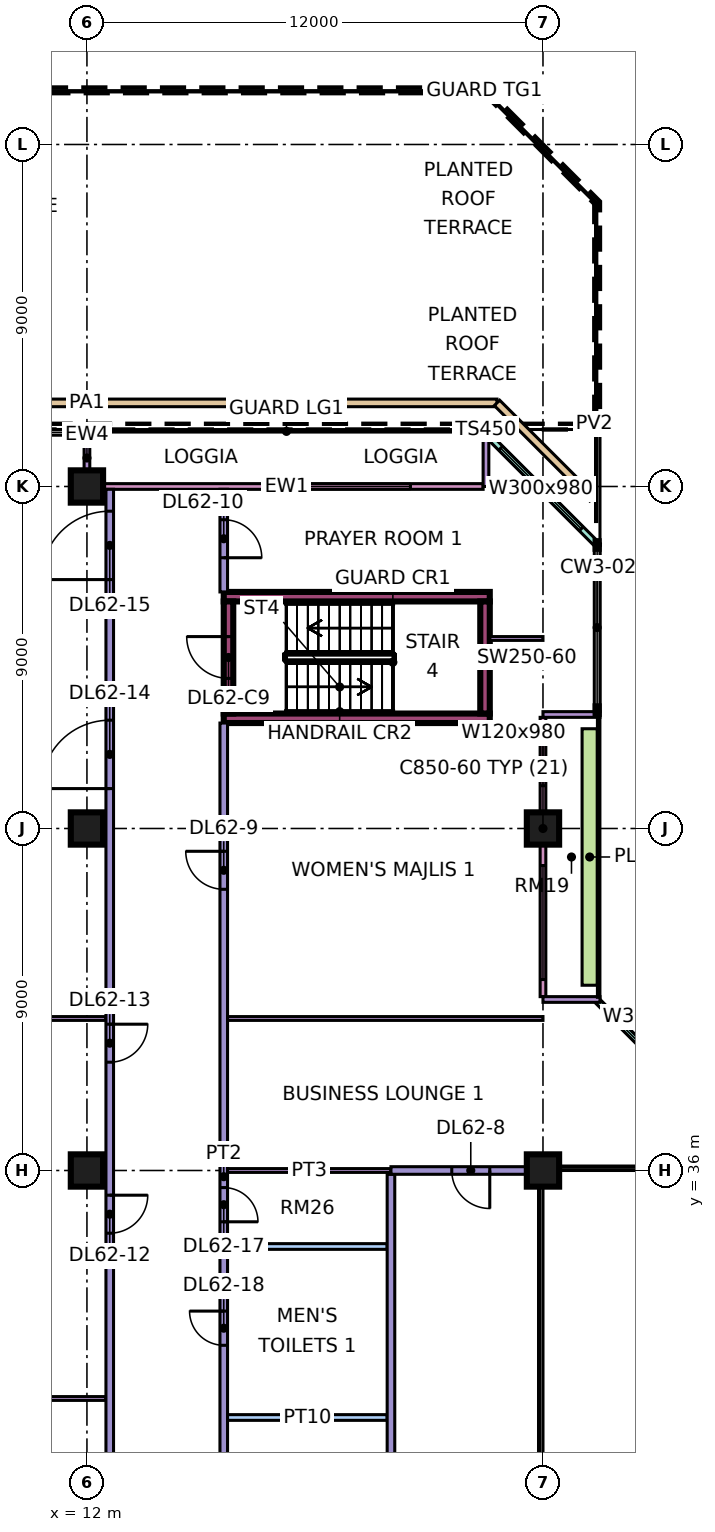
"""IFC4 building model, lengths in metres.
Left out: names, types, materials, properties, quantities, classifications, styles, units other than length and angle.
Written with IfcOpenShell. Run it as: python <this file> out.ifc"""

import sys

from ifc_helpers import new_model, si_unit, direction, frame, frame_2d, origin, origin_2d, place, context, subcontext, project, spatial, rectangle, extrude, element, fill, save


model = new_model("IFC4")
c1 = context("Model", 3, precision=1e-05, world=origin(), true_north=direction((0.0, 1.0)))
c2 = subcontext(c1, "Body", "Model", "MODEL_VIEW")
j1 = project(units=[si_unit("LENGTHUNIT", "METRE"), si_unit("PLANEANGLEUNIT", "RADIAN")], contexts=[c1])
p1 = place(None, origin())
s1 = spatial("IfcSite", under=j1, at=p1, CompositionType="ELEMENT")
p2 = place(p1, origin())
s2 = spatial("IfcBuilding", under=s1, at=p2, CompositionType="ELEMENT")
p3 = place(p2, frame((0.0, 0.0, 262.15)))
s3 = spatial("IfcBuildingStorey", under=s2, at=p3, CompositionType="ELEMENT", Elevation=262.15)
for number, where, z_axis, x_axis in (
    (1, (12.0, 36.0, 0.0), (0.0, 0.0, 1.0), (1.0, 0.0, 0.0)),
    (2, (12.0, 45.0, 0.0), (0.0, 0.0, 1.0), (1.0, 0.0, 0.0)),
    (3, (12.0, 54.0, 0.0), (0.0, 0.0, 1.0), (1.0, 0.0, 0.0)),
    (4, (24.0, 36.0, 0.0), (0.0, 0.0, 1.0), (1.0, 0.0, 0.0)),
    (5, (24.0, 45.0, 0.0), (0.0, 0.0, 1.0), (1.0, 0.0, 0.0)),
):
    element("IfcColumn", number, at=place(p3, frame(where, z_axis=z_axis, x_axis=x_axis)), inside=s3, PredefinedType="COLUMN", context=c2, shape_type="SweptSolid", body=[
        extrude(rectangle(XDim=0.85, YDim=0.85, at=origin_2d()), origin(), (0.0, 0.0, 1.0), 11.25),
    ])
for number, where, z_axis, x_axis in (
    (6, (15.6, 47.9, 0.0), (0.0, 0.0, 1.0), (1.0, 0.0, 0.0)),
    (7, (15.6, 51.1, 0.0), (0.0, 0.0, 1.0), (1.0, 0.0, 0.0)),
):
    element("IfcWall", number, at=place(p3, frame(where, z_axis=z_axis, x_axis=x_axis)), inside=s3, PredefinedType="SHEAR", context=c2, shape_type="SweptSolid", body=[
        extrude(rectangle(XDim=7.0, YDim=0.25, at=frame_2d((3.5, 0.0))), origin(), (0.0, 0.0, 1.0), 11.25),
    ])
p4 = place(p3, frame((15.725, 48.025, 0.0), z_axis=(0.0, 0.0, 1.0), x_axis=(0.0, 1.0, 0.0)))
e8 = element("IfcWall", 8, at=p4, inside=s3, PredefinedType="SHEAR", context=c2, shape_type="SweptSolid", body=[
    extrude(rectangle(XDim=2.95, YDim=0.25, at=frame_2d((1.475, 0.0))), origin(), (0.0, 0.0, 1.0), 11.25),
])
p5 = place(p4, frame((0.925, 0.0, 0.0)))
e9 = element("IfcOpeningElement", 9, at=p5, cuts=e8, PredefinedType="OPENING", context=c2, shape_type="SweptSolid", body=[
    extrude(rectangle(XDim=1.1, YDim=2.2, at=frame_2d((0.55, 1.1))), frame((0.0, 0.135, 0.0), z_axis=(0.0, -1.0, 0.0), x_axis=(1.0, 0.0, 0.0)), (0.0, 0.0, 1.0), 0.27),
])
p6 = place(p3, frame((22.475, 48.025, 0.0), z_axis=(0.0, 0.0, 1.0), x_axis=(0.0, 1.0, 0.0)))
e10 = element("IfcWall", 10, at=p6, inside=s3, PredefinedType="SHEAR", context=c2, shape_type="SweptSolid", body=[
    extrude(rectangle(XDim=2.95, YDim=0.25, at=frame_2d((1.475, 0.0))), origin(), (0.0, 0.0, 1.0), 11.25),
])
p7 = place(p3, frame((28.447, 37.447, 0.0), z_axis=(0.0, 0.0, 1.0), x_axis=(-0.707106781187, 0.707106781187, 0.0)))
e11 = element("IfcWall", 11, at=p7, inside=s3, PredefinedType="SOLIDWALL", context=c2, shape_type="SweptSolid", body=[
    extrude(rectangle(XDim=4.243, YDim=0.15, at=frame_2d((2.121, 0.0))), origin(), (0.0, 0.0, 1.0), 10.85),
])
p8 = place(p7, frame((0.621, 0.0, 0.45)))
e12 = element("IfcOpeningElement", 12, at=p8, cuts=e11, PredefinedType="OPENING", context=c2, shape_type="SweptSolid", body=[
    extrude(rectangle(XDim=3.0, YDim=9.8, at=frame_2d((1.5, 4.9))), frame((0.0, 0.085, 0.0), z_axis=(0.0, -1.0, 0.0), x_axis=(1.0, 0.0, 0.0)), (0.0, 0.0, 1.0), 0.17),
])
p9 = place(p3, frame((24.0, 40.575, 0.0), z_axis=(0.0, 0.0, 1.0), x_axis=(0.0, 1.0, 0.0)))
e13 = element("IfcWall", 13, at=p9, inside=s3, PredefinedType="SOLIDWALL", context=c2, shape_type="SweptSolid", body=[
    extrude(rectangle(XDim=7.35, YDim=0.15, at=frame_2d((3.675, 0.0))), origin(), (0.0, 0.0, 1.0), 10.85),
])
p10 = place(p9, frame((0.45, 0.0, 0.45)))
e14 = element("IfcOpeningElement", 14, at=p10, cuts=e13, PredefinedType="OPENING", context=c2, shape_type="SweptSolid", body=[
    extrude(rectangle(XDim=3.0, YDim=9.8, at=frame_2d((1.5, 4.9))), frame((0.0, 0.085, 0.0), z_axis=(0.0, -1.0, 0.0), x_axis=(1.0, 0.0, 0.0)), (0.0, 0.0, 1.0), 0.17),
])
p11 = place(p9, frame((5.55, 0.0, 0.45)))
e15 = element("IfcOpeningElement", 15, at=p11, cuts=e13, PredefinedType="OPENING", context=c2, shape_type="SweptSolid", body=[
    extrude(rectangle(XDim=1.2, YDim=9.8, at=frame_2d((0.6, 4.9))), frame((0.0, 0.085, 0.0), z_axis=(0.0, -1.0, 0.0), x_axis=(1.0, 0.0, 0.0)), (0.0, 0.0, 1.0), 0.17),
])
for number, where, z_axis, x_axis in (
    (16, (25.5, 40.5, 0.0), (0.0, 0.0, 1.0), (-1.0, 0.0, 0.0)),
    (17, (25.5, 48.0, 0.0), (0.0, 0.0, 1.0), (-1.0, 0.0, 0.0)),
):
    element("IfcWall", number, at=place(p3, frame(where, z_axis=z_axis, x_axis=x_axis)), inside=s3, PredefinedType="SOLIDWALL", context=c2, shape_type="SweptSolid", body=[
        extrude(rectangle(XDim=1.5, YDim=0.15, at=frame_2d((0.75, 0.0))), origin(), (0.0, 0.0, 1.0), 10.85),
    ])
p12 = place(p3, frame((25.447, 52.447, 0.0), z_axis=(0.0, 0.0, 1.0), x_axis=(-0.707106781187, 0.707106781187, 0.0)))
e18 = element("IfcWall", 18, at=p12, inside=s3, PredefinedType="SOLIDWALL", context=c2, shape_type="SweptSolid", body=[
    extrude(rectangle(XDim=4.243, YDim=0.15, at=frame_2d((2.121, 0.0))), origin(), (0.0, 0.0, 1.0), 10.85),
])
p13 = place(p12, frame((0.621, 0.0, 0.45)))
e19 = element("IfcOpeningElement", 19, at=p13, cuts=e18, PredefinedType="OPENING", context=c2, shape_type="SweptSolid", body=[
    extrude(rectangle(XDim=3.0, YDim=9.8, at=frame_2d((1.5, 4.9))), frame((0.0, 0.085, 0.0), z_axis=(0.0, -1.0, 0.0), x_axis=(1.0, 0.0, 0.0)), (0.0, 0.0, 1.0), 0.17),
])
p14 = place(p3, frame((22.425, 54.0, 0.0), z_axis=(0.0, 0.0, 1.0), x_axis=(-1.0, 0.0, 0.0)))
e20 = element("IfcWall", 20, at=p14, inside=s3, PredefinedType="SOLIDWALL", context=c2, shape_type="SweptSolid", body=[
    extrude(rectangle(XDim=10.35, YDim=0.15, at=frame_2d((5.175, 0.0))), origin(), (0.0, 0.0, 1.0), 10.85),
])
p15 = place(p14, frame((1.913, 0.0, 0.45)))
e21 = element("IfcOpeningElement", 21, at=p15, cuts=e20, PredefinedType="OPENING", context=c2, shape_type="SweptSolid", body=[
    extrude(rectangle(XDim=3.0, YDim=9.8, at=frame_2d((1.5, 4.9))), frame((0.0, 0.085, 0.0), z_axis=(0.0, -1.0, 0.0), x_axis=(1.0, 0.0, 0.0)), (0.0, 0.0, 1.0), 0.17),
])
for number, where, z_axis, x_axis in (
    (22, (22.5, 55.5, 0.0), (0.0, 0.0, 1.0), (0.0, -1.0, 0.0)),
    (23, (12.0, 55.5, 0.0), (0.0, 0.0, 1.0), (0.0, -1.0, 0.0)),
):
    element("IfcWall", number, at=place(p3, frame(where, z_axis=z_axis, x_axis=x_axis)), inside=s3, PredefinedType="SOLIDWALL", context=c2, shape_type="SweptSolid", body=[
        extrude(rectangle(XDim=1.5, YDim=0.15, at=frame_2d((0.75, 0.0))), origin(), (0.0, 0.0, 1.0), 10.85),
    ])
p16 = place(p3, frame((25.229, 40.875, 0.0), z_axis=(0.0, 0.0, 1.0), x_axis=(0.0, 1.0, 0.0)))
e24 = element("IfcWall", 24, at=p16, inside=s3, PredefinedType="SOLIDWALL", context=c2, shape_type="SweptSolid", body=[
    extrude(rectangle(XDim=6.75, YDim=0.4, at=frame_2d((3.375, 0.0))), origin(), (0.0, 0.0, 1.0), 0.7),
])
p17 = place(p3, frame((1.21, 56.2, 0.0), z_axis=(0.0, 0.0, 1.0), x_axis=(1.0, 0.0, 0.0)))
e25 = element("IfcWall", 25, at=p17, inside=s3, PredefinedType="PARAPET", context=c2, shape_type="SweptSolid", body=[
    extrude(rectangle(XDim=21.58, YDim=0.2, at=frame_2d((10.79, 0.0))), origin(), (0.0, 0.0, 1.0), 0.5),
])
p18 = place(p3, frame((22.79, 56.2, 0.0), z_axis=(0.0, 0.0, 1.0), x_axis=(0.707106781187, -0.707106781187, 0.0)))
e26 = element("IfcWall", 26, at=p18, inside=s3, PredefinedType="PARAPET", context=c2, shape_type="SweptSolid", body=[
    extrude(rectangle(XDim=3.55, YDim=0.2, at=frame_2d((1.775, 0.0))), origin(), (0.0, 0.0, 1.0), 0.5),
])
p19 = place(p3, frame((0.0, 30.0, 0.0), z_axis=(0.0, 0.0, 1.0), x_axis=(1.0, 0.0, 0.0)))
e27 = element("IfcWall", 27, at=p19, inside=s3, PredefinedType="PARTITIONING", context=c2, shape_type="SweptSolid", body=[
    extrude(rectangle(XDim=12.5, YDim=0.1, at=frame_2d((6.25, 0.0))), origin(), (0.0, 0.0, 1.0), 10.85),
])
p20 = place(p3, frame((0.074, 40.0, 0.0), z_axis=(0.0, 0.0, 1.0), x_axis=(1.0, 0.0, 0.0)))
e28 = element("IfcWall", 28, at=p20, inside=s3, PredefinedType="PARTITIONING", context=c2, shape_type="SweptSolid", body=[
    extrude(rectangle(XDim=12.426, YDim=0.1, at=frame_2d((6.213, 0.0))), origin(), (0.0, 0.0, 1.0), 10.85),
])
p21 = place(p3, frame((12.6, 22.9, 0.0), z_axis=(0.0, 0.0, 1.0), x_axis=(0.0, 1.0, 0.0)))
e29 = element("IfcWall", 29, at=p21, inside=s3, PredefinedType="PARTITIONING", context=c2, shape_type="SweptSolid", body=[
    extrude(rectangle(XDim=31.026, YDim=0.2, at=frame_2d((15.513, 0.0))), origin(), (0.0, 0.0, 1.0), 10.85),
])
p22 = place(p21, frame((11.45, 0.0, 0.0)))
e30 = element("IfcOpeningElement", 30, at=p22, cuts=e29, PredefinedType="OPENING", context=c2, shape_type="SweptSolid", body=[
    extrude(rectangle(XDim=1.0, YDim=2.1, at=frame_2d((0.5, 1.05))), frame((0.0, 0.11, 0.0), z_axis=(0.0, -1.0, 0.0), x_axis=(1.0, 0.0, 0.0)), (0.0, 0.0, 1.0), 0.22),
])
p23 = place(p21, frame((15.95, 0.0, 0.0)))
e31 = element("IfcOpeningElement", 31, at=p23, cuts=e29, PredefinedType="OPENING", context=c2, shape_type="SweptSolid", body=[
    extrude(rectangle(XDim=1.0, YDim=2.1, at=frame_2d((0.5, 1.05))), frame((0.0, 0.11, 0.0), z_axis=(0.0, -1.0, 0.0), x_axis=(1.0, 0.0, 0.0)), (0.0, 0.0, 1.0), 0.22),
])
p24 = place(p21, frame((23.15, 0.0, 0.0)))
e32 = element("IfcOpeningElement", 32, at=p24, cuts=e29, PredefinedType="OPENING", context=c2, shape_type="SweptSolid", body=[
    extrude(rectangle(XDim=1.8, YDim=2.1, at=frame_2d((0.9, 1.05))), frame((0.0, 0.11, 0.0), z_axis=(0.0, -1.0, 0.0), x_axis=(1.0, 0.0, 0.0)), (0.0, 0.0, 1.0), 0.22),
])
p25 = place(p21, frame((28.65, 0.0, 0.0)))
e33 = element("IfcOpeningElement", 33, at=p25, cuts=e29, PredefinedType="OPENING", context=c2, shape_type="SweptSolid", body=[
    extrude(rectangle(XDim=1.8, YDim=2.1, at=frame_2d((0.9, 1.05))), frame((0.0, 0.11, 0.0), z_axis=(0.0, -1.0, 0.0), x_axis=(1.0, 0.0, 0.0)), (0.0, 0.0, 1.0), 0.22),
])
p26 = place(p3, frame((15.6, 23.9, 0.0), z_axis=(0.0, 0.0, 1.0), x_axis=(0.0, 1.0, 0.0)))
e34 = element("IfcWall", 34, at=p26, inside=s3, PredefinedType="PARTITIONING", context=c2, shape_type="SweptSolid", body=[
    extrude(rectangle(XDim=23.875, YDim=0.2, at=frame_2d((11.938, 0.0))), origin(), (0.0, 0.0, 1.0), 10.85),
])
p27 = place(p26, frame((19.5, 0.0, 0.0)))
e35 = element("IfcOpeningElement", 35, at=p27, cuts=e34, PredefinedType="OPENING", context=c2, shape_type="SweptSolid", body=[
    extrude(rectangle(XDim=1.0, YDim=2.1, at=frame_2d((0.5, 1.05))), frame((0.0, 0.11, 0.0), z_axis=(0.0, -1.0, 0.0), x_axis=(1.0, 0.0, 0.0)), (0.0, 0.0, 1.0), 0.22),
])
p28 = place(p26, frame((10.75, 0.0, 0.0)))
e36 = element("IfcOpeningElement", 36, at=p28, cuts=e34, PredefinedType="OPENING", context=c2, shape_type="SweptSolid", body=[
    extrude(rectangle(XDim=0.9, YDim=2.1, at=frame_2d((0.45, 1.05))), frame((0.0, 0.11, 0.0), z_axis=(0.0, -1.0, 0.0), x_axis=(1.0, 0.0, 0.0)), (0.0, 0.0, 1.0), 0.22),
])
p29 = place(p26, frame((7.5, 0.0, 0.0)))
e37 = element("IfcOpeningElement", 37, at=p29, cuts=e34, PredefinedType="OPENING", context=c2, shape_type="SweptSolid", body=[
    extrude(rectangle(XDim=0.9, YDim=2.1, at=frame_2d((0.45, 1.05))), frame((0.0, 0.11, 0.0), z_axis=(0.0, -1.0, 0.0), x_axis=(1.0, 0.0, 0.0)), (0.0, 0.0, 1.0), 0.22),
])
p30 = place(p26, frame((2.5, 0.0, 0.0)))
e38 = element("IfcOpeningElement", 38, at=p30, cuts=e34, PredefinedType="OPENING", context=c2, shape_type="SweptSolid", body=[
    extrude(rectangle(XDim=0.9, YDim=2.1, at=frame_2d((0.45, 1.05))), frame((0.0, 0.11, 0.0), z_axis=(0.0, -1.0, 0.0), x_axis=(1.0, 0.0, 0.0)), (0.0, 0.0, 1.0), 0.22),
])
p31 = place(p3, frame((15.6, 51.225, 0.0), z_axis=(0.0, 0.0, 1.0), x_axis=(0.0, 1.0, 0.0)))
e39 = element("IfcWall", 39, at=p31, inside=s3, PredefinedType="PARTITIONING", context=c2, shape_type="SweptSolid", body=[
    extrude(rectangle(XDim=2.701, YDim=0.2, at=frame_2d((1.351, 0.0))), origin(), (0.0, 0.0, 1.0), 10.85),
])
p32 = place(p31, frame((0.9, 0.0, 0.0)))
e40 = element("IfcOpeningElement", 40, at=p32, cuts=e39, PredefinedType="OPENING", context=c2, shape_type="SweptSolid", body=[
    extrude(rectangle(XDim=1.0, YDim=2.1, at=frame_2d((0.5, 1.05))), frame((0.0, 0.11, 0.0), z_axis=(0.0, -1.0, 0.0), x_axis=(1.0, 0.0, 0.0)), (0.0, 0.0, 1.0), 0.22),
])
for number, where, z_axis, x_axis in (
    (41, (15.7, 29.5, 0.0), (0.0, 0.0, 1.0), (1.0, 0.0, 0.0)),
    (42, (15.7, 34.0, 0.0), (0.0, 0.0, 1.0), (1.0, 0.0, 0.0)),
):
    element("IfcWall", number, at=place(p3, frame(where, z_axis=z_axis, x_axis=x_axis)), inside=s3, PredefinedType="PARTITIONING", context=c2, shape_type="SweptSolid", body=[
        extrude(rectangle(XDim=4.2, YDim=0.15, at=frame_2d((2.1, 0.0))), origin(), (0.0, 0.0, 1.0), 10.85),
    ])
p33 = place(p3, frame((15.7, 36.0, 0.0), z_axis=(0.0, 0.0, 1.0), x_axis=(1.0, 0.0, 0.0)))
e43 = element("IfcWall", 43, at=p33, inside=s3, PredefinedType="PARTITIONING", context=c2, shape_type="SweptSolid", body=[
    extrude(rectangle(XDim=4.3, YDim=0.1, at=frame_2d((2.15, 0.0))), origin(), (0.0, 0.0, 1.0), 10.85),
])
p34 = place(p3, frame((15.7, 40.0, 0.0), z_axis=(0.0, 0.0, 1.0), x_axis=(1.0, 0.0, 0.0)))
e44 = element("IfcWall", 44, at=p34, inside=s3, PredefinedType="PARTITIONING", context=c2, shape_type="SweptSolid", body=[
    extrude(rectangle(XDim=8.3, YDim=0.1, at=frame_2d((4.15, 0.0))), origin(), (0.0, 0.0, 1.0), 10.85),
])
p35 = place(p3, frame((20.0, 23.9, 0.0), z_axis=(0.0, 0.0, 1.0), x_axis=(0.0, 1.0, 0.0)))
e45 = element("IfcWall", 45, at=p35, inside=s3, PredefinedType="PARTITIONING", context=c2, shape_type="SweptSolid", body=[
    extrude(rectangle(XDim=12.0, YDim=0.2, at=frame_2d((6.0, 0.0))), origin(), (0.0, 0.0, 1.0), 10.85),
])
p36 = place(p3, frame((20.0, 36.0, 0.0), z_axis=(0.0, 0.0, 1.0), x_axis=(1.0, 0.0, 0.0)))
e46 = element("IfcWall", 46, at=p36, inside=s3, PredefinedType="PARTITIONING", context=c2, shape_type="SweptSolid", body=[
    extrude(rectangle(XDim=4.0, YDim=0.2, at=frame_2d((2.0, 0.0))), origin(), (0.0, 0.0, 1.0), 10.85),
])
p37 = place(p36, frame((1.6, 0.0, 0.0)))
e47 = element("IfcOpeningElement", 47, at=p37, cuts=e46, PredefinedType="OPENING", context=c2, shape_type="SweptSolid", body=[
    extrude(rectangle(XDim=1.0, YDim=2.1, at=frame_2d((0.5, 1.05))), frame((0.0, 0.11, 0.0), z_axis=(0.0, -1.0, 0.0), x_axis=(1.0, 0.0, 0.0)), (0.0, 0.0, 1.0), 0.22),
])
p38 = place(p3, frame((22.6, 50.0, 0.0), z_axis=(0.0, 0.0, 1.0), x_axis=(1.0, 0.0, 0.0)))
e48 = element("IfcWall", 48, at=p38, inside=s3, PredefinedType="PARTITIONING", context=c2, shape_type="SweptSolid", body=[
    extrude(rectangle(XDim=1.4, YDim=0.1, at=frame_2d((0.7, 0.0))), origin(), (0.0, 0.0, 1.0), 10.85),
])
p39 = place(p8, origin())
e49 = element("IfcWindow", 49, at=p39, inside=s3, PartitioningType="SINGLE_PANEL", PredefinedType="WINDOW", context=c2, shape_type="SweptSolid", body=[
    extrude(rectangle(XDim=3.0, YDim=9.8, at=frame_2d((1.5, 4.9))), frame((0.0, 0.03, 0.0), z_axis=(0.0, -1.0, 0.0), x_axis=(1.0, 0.0, 0.0)), (0.0, 0.0, 1.0), 0.06),
])
fill(e12, e49)
p40 = place(p10, origin())
e50 = element("IfcWindow", 50, at=p40, inside=s3, PartitioningType="SINGLE_PANEL", PredefinedType="WINDOW", context=c2, shape_type="SweptSolid", body=[
    extrude(rectangle(XDim=3.0, YDim=9.8, at=frame_2d((1.5, 4.9))), frame((0.0, 0.03, 0.0), z_axis=(0.0, -1.0, 0.0), x_axis=(1.0, 0.0, 0.0)), (0.0, 0.0, 1.0), 0.06),
])
fill(e14, e50)
p41 = place(p11, origin())
e51 = element("IfcWindow", 51, at=p41, inside=s3, PartitioningType="SINGLE_PANEL", PredefinedType="WINDOW", context=c2, shape_type="SweptSolid", body=[
    extrude(rectangle(XDim=1.2, YDim=9.8, at=frame_2d((0.6, 4.9))), frame((0.0, 0.03, 0.0), z_axis=(0.0, -1.0, 0.0), x_axis=(1.0, 0.0, 0.0)), (0.0, 0.0, 1.0), 0.06),
])
fill(e15, e51)
p42 = place(p13, origin())
e52 = element("IfcWindow", 52, at=p42, inside=s3, PartitioningType="SINGLE_PANEL", PredefinedType="WINDOW", context=c2, shape_type="SweptSolid", body=[
    extrude(rectangle(XDim=3.0, YDim=9.8, at=frame_2d((1.5, 4.9))), frame((0.0, 0.03, 0.0), z_axis=(0.0, -1.0, 0.0), x_axis=(1.0, 0.0, 0.0)), (0.0, 0.0, 1.0), 0.06),
])
fill(e19, e52)
p43 = place(p15, origin())
e53 = element("IfcWindow", 53, at=p43, inside=s3, PartitioningType="SINGLE_PANEL", PredefinedType="WINDOW", context=c2, shape_type="SweptSolid", body=[
    extrude(rectangle(XDim=3.0, YDim=9.8, at=frame_2d((1.5, 4.9))), frame((0.0, 0.03, 0.0), z_axis=(0.0, -1.0, 0.0), x_axis=(1.0, 0.0, 0.0)), (0.0, 0.0, 1.0), 0.06),
])
fill(e21, e53)
p44 = place(p5, frame((1.1, 0.0, 0.0), z_axis=(0.0, 0.0, 1.0), x_axis=(-1.0, 0.0, 0.0)))
e54 = element("IfcDoor", 54, at=p44, inside=s3, OperationType="SINGLE_SWING_RIGHT", PredefinedType="DOOR", context=c2, shape_type="SweptSolid", body=[
    extrude(rectangle(XDim=1.1, YDim=2.2, at=frame_2d((0.55, 1.1))), frame((0.0, 0.025, 0.0), z_axis=(0.0, -1.0, 0.0), x_axis=(1.0, 0.0, 0.0)), (0.0, 0.0, 1.0), 0.05),
])
fill(e9, e54)
p45 = place(p37, origin())
e55 = element("IfcDoor", 55, at=p45, inside=s3, OperationType="SINGLE_SWING_RIGHT", PredefinedType="DOOR", context=c2, shape_type="SweptSolid", body=[
    extrude(rectangle(XDim=1.0, YDim=2.1, at=frame_2d((0.5, 1.05))), frame((0.0, 0.025, 0.0), z_axis=(0.0, -1.0, 0.0), x_axis=(1.0, 0.0, 0.0)), (0.0, 0.0, 1.0), 0.05),
])
fill(e47, e55)
p46 = place(p27, frame((1.0, 0.0, 0.0), z_axis=(0.0, 0.0, 1.0), x_axis=(-1.0, 0.0, 0.0)))
e56 = element("IfcDoor", 56, at=p46, inside=s3, OperationType="SINGLE_SWING_RIGHT", PredefinedType="DOOR", context=c2, shape_type="SweptSolid", body=[
    extrude(rectangle(XDim=1.0, YDim=2.1, at=frame_2d((0.5, 1.05))), frame((0.0, 0.025, 0.0), z_axis=(0.0, -1.0, 0.0), x_axis=(1.0, 0.0, 0.0)), (0.0, 0.0, 1.0), 0.05),
])
fill(e35, e56)
p47 = place(p32, frame((1.0, 0.0, 0.0), z_axis=(0.0, 0.0, 1.0), x_axis=(-1.0, 0.0, 0.0)))
e57 = element("IfcDoor", 57, at=p47, inside=s3, OperationType="SINGLE_SWING_LEFT", PredefinedType="DOOR", context=c2, shape_type="SweptSolid", body=[
    extrude(rectangle(XDim=1.0, YDim=2.1, at=frame_2d((0.5, 1.05))), frame((0.0, 0.025, 0.0), z_axis=(0.0, -1.0, 0.0), x_axis=(1.0, 0.0, 0.0)), (0.0, 0.0, 1.0), 0.05),
])
fill(e40, e57)
p48 = place(p22, origin())
e58 = element("IfcDoor", 58, at=p48, inside=s3, OperationType="SINGLE_SWING_RIGHT", PredefinedType="DOOR", context=c2, shape_type="SweptSolid", body=[
    extrude(rectangle(XDim=1.0, YDim=2.1, at=frame_2d((0.5, 1.05))), frame((0.0, 0.025, 0.0), z_axis=(0.0, -1.0, 0.0), x_axis=(1.0, 0.0, 0.0)), (0.0, 0.0, 1.0), 0.05),
])
fill(e30, e58)
p49 = place(p23, origin())
e59 = element("IfcDoor", 59, at=p49, inside=s3, OperationType="SINGLE_SWING_RIGHT", PredefinedType="DOOR", context=c2, shape_type="SweptSolid", body=[
    extrude(rectangle(XDim=1.0, YDim=2.1, at=frame_2d((0.5, 1.05))), frame((0.0, 0.025, 0.0), z_axis=(0.0, -1.0, 0.0), x_axis=(1.0, 0.0, 0.0)), (0.0, 0.0, 1.0), 0.05),
])
fill(e31, e59)
p50 = place(p24, origin())
e60 = element("IfcDoor", 60, at=p50, inside=s3, OperationType="DOUBLE_DOOR_SINGLE_SWING", PredefinedType="DOOR", context=c2, shape_type="SweptSolid", body=[
    extrude(rectangle(XDim=1.8, YDim=2.1, at=frame_2d((0.9, 1.05))), frame((0.0, 0.025, 0.0), z_axis=(0.0, -1.0, 0.0), x_axis=(1.0, 0.0, 0.0)), (0.0, 0.0, 1.0), 0.05),
])
fill(e32, e60)
p51 = place(p25, origin())
e61 = element("IfcDoor", 61, at=p51, inside=s3, OperationType="DOUBLE_DOOR_SINGLE_SWING", PredefinedType="DOOR", context=c2, shape_type="SweptSolid", body=[
    extrude(rectangle(XDim=1.8, YDim=2.1, at=frame_2d((0.9, 1.05))), frame((0.0, 0.025, 0.0), z_axis=(0.0, -1.0, 0.0), x_axis=(1.0, 0.0, 0.0)), (0.0, 0.0, 1.0), 0.05),
])
fill(e33, e61)
p52 = place(p28, frame((0.9, 0.0, 0.0), z_axis=(0.0, 0.0, 1.0), x_axis=(-1.0, 0.0, 0.0)))
e62 = element("IfcDoor", 62, at=p52, inside=s3, OperationType="SINGLE_SWING_LEFT", PredefinedType="DOOR", context=c2, shape_type="SweptSolid", body=[
    extrude(rectangle(XDim=0.9, YDim=2.1, at=frame_2d((0.45, 1.05))), frame((0.0, 0.025, 0.0), z_axis=(0.0, -1.0, 0.0), x_axis=(1.0, 0.0, 0.0)), (0.0, 0.0, 1.0), 0.05),
])
fill(e36, e62)
p53 = place(p29, frame((0.9, 0.0, 0.0), z_axis=(0.0, 0.0, 1.0), x_axis=(-1.0, 0.0, 0.0)))
e63 = element("IfcDoor", 63, at=p53, inside=s3, OperationType="SINGLE_SWING_RIGHT", PredefinedType="DOOR", context=c2, shape_type="SweptSolid", body=[
    extrude(rectangle(XDim=0.9, YDim=2.1, at=frame_2d((0.45, 1.05))), frame((0.0, 0.025, 0.0), z_axis=(0.0, -1.0, 0.0), x_axis=(1.0, 0.0, 0.0)), (0.0, 0.0, 1.0), 0.05),
])
fill(e37, e63)
save(model, sys.argv[1])
